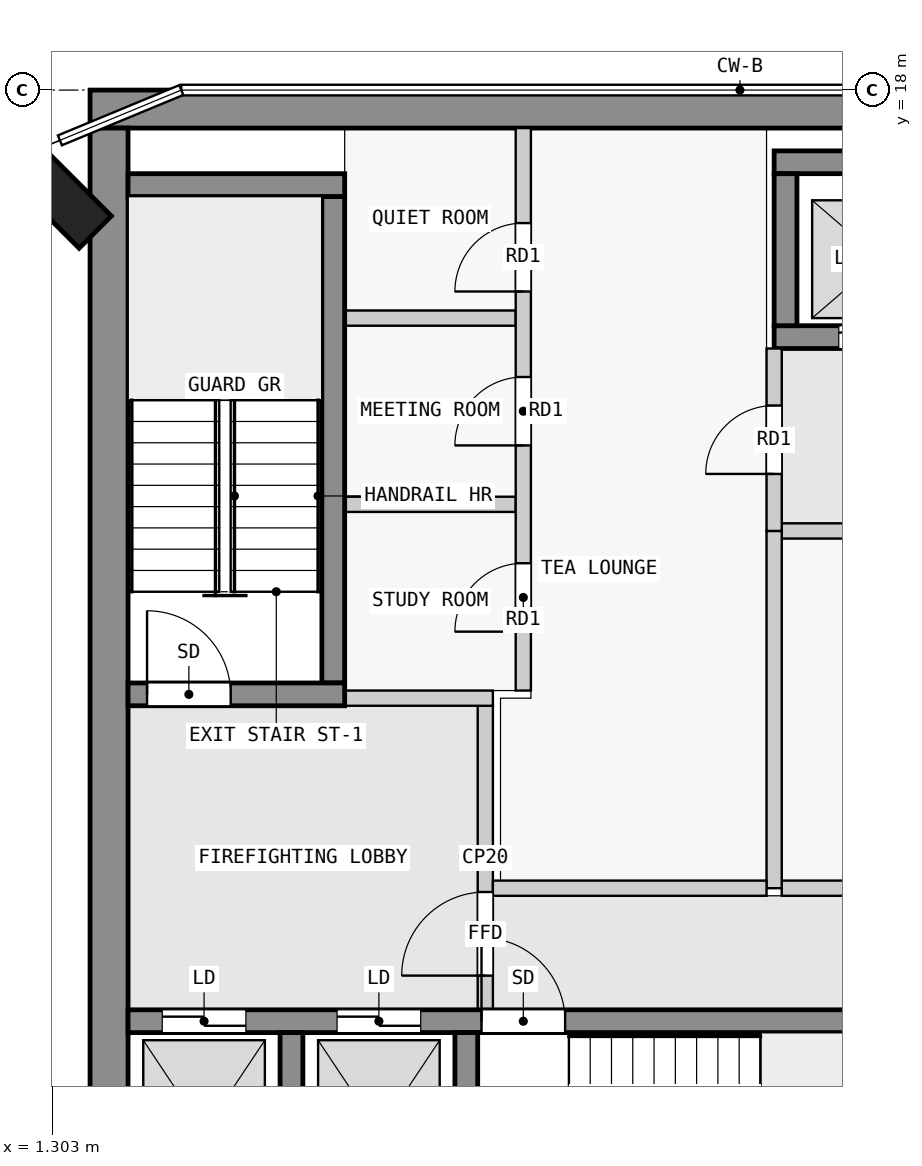
"""IFC4 building model, lengths in metres.
Left out: names, types, materials, properties, quantities, classifications, styles, units other than length and angle.
Written with IfcOpenShell. Run it as: python <this file> out.ifc"""

import sys

from ifc_helpers import new_model, si_unit, direction, frame, frame_2d, origin, origin_2d, place, context, subcontext, project, spatial, rectangle, extrude, element, fill, save


model = new_model("IFC4")
c1 = context("Model", 3, precision=1e-05, world=origin(), true_north=direction((0.0, 1.0)))
c2 = subcontext(c1, "Body", "Model", "MODEL_VIEW")
j1 = project(units=[si_unit("LENGTHUNIT", "METRE"), si_unit("PLANEANGLEUNIT", "RADIAN")], contexts=[c1])
p1 = place(None, origin())
s1 = spatial("IfcSite", under=j1, at=p1, CompositionType="ELEMENT")
p2 = place(p1, origin())
s2 = spatial("IfcBuilding", under=s1, at=p2, CompositionType="ELEMENT")
p3 = place(p2, frame((0.0, 0.0, 245.9)))
s3 = spatial("IfcBuildingStorey", under=s2, at=p3, CompositionType="ELEMENT", Elevation=245.9)
p4 = place(p3, frame((1.374, 16.626, 0.0), z_axis=(0.0, 0.0, 1.0), x_axis=(0.707106781187, 0.707106781187, 0.0)))
e1 = element("IfcColumn", 1, at=p4, inside=s3, PredefinedType="COLUMN", context=c2, shape_type="SweptSolid", body=[
    extrude(rectangle(XDim=0.6, YDim=1.4, at=origin_2d()), origin(), (0.0, 0.0, 1.0), 3.5),
])
p5 = place(p3, frame((1.8, 17.75, 0.0), z_axis=(0.0, 0.0, 1.0), x_axis=(1.0, 0.0, 0.0)))
e2 = element("IfcWall", 2, at=p5, inside=s3, PredefinedType="SHEAR", context=c2, shape_type="SweptSolid", body=[
    extrude(rectangle(XDim=20.7, YDim=0.5, at=frame_2d((10.35, 0.0))), origin(), (0.0, 0.0, 1.0), 3.25),
])
p6 = place(p3, frame((2.05, 2.5, 0.0), z_axis=(0.0, 0.0, 1.0), x_axis=(0.0, 1.0, 0.0)))
e3 = element("IfcWall", 3, at=p6, inside=s3, PredefinedType="SHEAR", context=c2, shape_type="SweptSolid", body=[
    extrude(rectangle(XDim=15.0, YDim=0.5, at=frame_2d((7.5, 0.0))), origin(), (0.0, 0.0, 1.0), 3.25),
])
for number, where, z_axis, x_axis in (
    (4, (4.45, 2.8, 0.0), (0.0, 0.0, 1.0), (0.0, 1.0, 0.0)),
    (5, (6.75, 2.8, 0.0), (0.0, 0.0, 1.0), (0.0, 1.0, 0.0)),
):
    element("IfcWall", number, at=place(p3, frame(where, z_axis=z_axis, x_axis=x_axis)), inside=s3, PredefinedType="SHEAR", context=c2, shape_type="SweptSolid", body=[
        extrude(rectangle(XDim=2.8, YDim=0.3, at=frame_2d((1.4, 0.0))), origin(), (0.0, 0.0, 1.0), 3.25),
    ])
p7 = place(p3, frame((2.3, 5.75, 0.0), z_axis=(0.0, 0.0, 1.0), x_axis=(1.0, 0.0, 0.0)))
e6 = element("IfcWall", 6, at=p7, inside=s3, PredefinedType="SHEAR", context=c2, shape_type="SweptSolid", body=[
    extrude(rectangle(XDim=18.8, YDim=0.3, at=frame_2d((9.4, 0.0))), origin(), (0.0, 0.0, 1.0), 3.25),
])
p8 = place(p7, frame((4.65, 0.0, 0.0)))
e7 = element("IfcOpeningElement", 7, at=p8, cuts=e6, PredefinedType="OPENING", context=c2, shape_type="SweptSolid", body=[
    extrude(rectangle(XDim=1.1, YDim=2.1, at=frame_2d((0.55, 1.05))), frame((0.0, 0.16, 0.0), z_axis=(0.0, -1.0, 0.0), x_axis=(1.0, 0.0, 0.0)), (0.0, 0.0, 1.0), 0.32),
])
p9 = place(p7, frame((0.45, 0.0, 0.0)))
e8 = element("IfcOpeningElement", 8, at=p9, cuts=e6, PredefinedType="OPENING", context=c2, shape_type="SweptSolid", body=[
    extrude(rectangle(XDim=1.1, YDim=2.1, at=frame_2d((0.55, 1.05))), frame((0.0, 0.16, 0.0), z_axis=(0.0, -1.0, 0.0), x_axis=(1.0, 0.0, 0.0)), (0.0, 0.0, 1.0), 0.32),
])
p10 = place(p7, frame((2.75, 0.0, 0.0)))
e9 = element("IfcOpeningElement", 9, at=p10, cuts=e6, PredefinedType="OPENING", context=c2, shape_type="SweptSolid", body=[
    extrude(rectangle(XDim=1.1, YDim=2.1, at=frame_2d((0.55, 1.05))), frame((0.0, 0.16, 0.0), z_axis=(0.0, -1.0, 0.0), x_axis=(1.0, 0.0, 0.0)), (0.0, 0.0, 1.0), 0.32),
])
p11 = place(p7, frame((13.2, 0.0, 0.0)))
e10 = element("IfcOpeningElement", 10, at=p11, cuts=e6, PredefinedType="OPENING", context=c2, shape_type="SweptSolid", body=[
    extrude(rectangle(XDim=0.9, YDim=2.1, at=frame_2d((0.45, 1.05))), frame((0.0, 0.16, 0.0), z_axis=(0.0, -1.0, 0.0), x_axis=(1.0, 0.0, 0.0)), (0.0, 0.0, 1.0), 0.32),
])
p12 = place(p7, frame((16.95, 0.0, 0.0)))
e11 = element("IfcOpeningElement", 11, at=p12, cuts=e6, PredefinedType="OPENING", context=c2, shape_type="SweptSolid", body=[
    extrude(rectangle(XDim=0.9, YDim=2.1, at=frame_2d((0.45, 1.05))), frame((0.0, 0.16, 0.0), z_axis=(0.0, -1.0, 0.0), x_axis=(1.0, 0.0, 0.0)), (0.0, 0.0, 1.0), 0.32),
])
p13 = place(p3, frame((2.3, 10.05, 0.0), z_axis=(0.0, 0.0, 1.0), x_axis=(1.0, 0.0, 0.0)))
e12 = element("IfcWall", 12, at=p13, inside=s3, PredefinedType="SHEAR", context=c2, shape_type="SweptSolid", body=[
    extrude(rectangle(XDim=2.85, YDim=0.3, at=frame_2d((1.425, 0.0))), origin(), (0.0, 0.0, 1.0), 3.25),
])
p14 = place(p13, frame((0.25, 0.0, 0.0)))
e13 = element("IfcOpeningElement", 13, at=p14, cuts=e12, PredefinedType="OPENING", context=c2, shape_type="SweptSolid", body=[
    extrude(rectangle(XDim=1.1, YDim=2.1, at=frame_2d((0.55, 1.05))), frame((0.0, 0.16, 0.0), z_axis=(0.0, -1.0, 0.0), x_axis=(1.0, 0.0, 0.0)), (0.0, 0.0, 1.0), 0.32),
])
p15 = place(p3, frame((5.0, 10.2, 0.0), z_axis=(0.0, 0.0, 1.0), x_axis=(0.0, 1.0, 0.0)))
e14 = element("IfcWall", 14, at=p15, inside=s3, PredefinedType="SHEAR", context=c2, shape_type="SweptSolid", body=[
    extrude(rectangle(XDim=6.4, YDim=0.3, at=frame_2d((3.2, 0.0))), origin(), (0.0, 0.0, 1.0), 3.25),
])
p16 = place(p3, frame((2.3, 16.75, 0.0), z_axis=(0.0, 0.0, 1.0), x_axis=(1.0, 0.0, 0.0)))
e15 = element("IfcWall", 15, at=p16, inside=s3, PredefinedType="SHEAR", context=c2, shape_type="SweptSolid", body=[
    extrude(rectangle(XDim=2.85, YDim=0.3, at=frame_2d((1.425, 0.0))), origin(), (0.0, 0.0, 1.0), 3.25),
])
p17 = place(p3, frame((10.8, 17.05, 0.0), z_axis=(0.0, 0.0, 1.0), x_axis=(1.0, 0.0, 0.0)))
e16 = element("IfcWall", 16, at=p17, inside=s3, PredefinedType="SHEAR", context=c2, shape_type="SweptSolid", body=[
    extrude(rectangle(XDim=7.8, YDim=0.3, at=frame_2d((3.9, 0.0))), origin(), (0.0, 0.0, 1.0), 3.25),
])
p18 = place(p3, frame((10.8, 14.75, 0.0), z_axis=(0.0, 0.0, 1.0), x_axis=(1.0, 0.0, 0.0)))
e17 = element("IfcWall", 17, at=p18, inside=s3, PredefinedType="SHEAR", context=c2, shape_type="SweptSolid", body=[
    extrude(rectangle(XDim=7.8, YDim=0.3, at=frame_2d((3.9, 0.0))), origin(), (0.0, 0.0, 1.0), 3.25),
])
p19 = place(p18, frame((0.85, 0.0, 0.0)))
e18 = element("IfcOpeningElement", 18, at=p19, cuts=e17, PredefinedType="OPENING", context=c2, shape_type="SweptSolid", body=[
    extrude(rectangle(XDim=1.1, YDim=2.1, at=frame_2d((0.55, 1.05))), frame((0.0, 0.16, 0.0), z_axis=(0.0, -1.0, 0.0), x_axis=(1.0, 0.0, 0.0)), (0.0, 0.0, 1.0), 0.32),
])
p20 = place(p18, frame((3.35, 0.0, 0.0)))
e19 = element("IfcOpeningElement", 19, at=p20, cuts=e17, PredefinedType="OPENING", context=c2, shape_type="SweptSolid", body=[
    extrude(rectangle(XDim=1.1, YDim=2.1, at=frame_2d((0.55, 1.05))), frame((0.0, 0.16, 0.0), z_axis=(0.0, -1.0, 0.0), x_axis=(1.0, 0.0, 0.0)), (0.0, 0.0, 1.0), 0.32),
])
p21 = place(p18, frame((5.85, 0.0, 0.0)))
e20 = element("IfcOpeningElement", 20, at=p21, cuts=e17, PredefinedType="OPENING", context=c2, shape_type="SweptSolid", body=[
    extrude(rectangle(XDim=1.1, YDim=2.1, at=frame_2d((0.55, 1.05))), frame((0.0, 0.16, 0.0), z_axis=(0.0, -1.0, 0.0), x_axis=(1.0, 0.0, 0.0)), (0.0, 0.0, 1.0), 0.32),
])
p22 = place(p3, frame((10.95, 14.9, 0.0), z_axis=(0.0, 0.0, 1.0), x_axis=(0.0, 1.0, 0.0)))
e21 = element("IfcWall", 21, at=p22, inside=s3, PredefinedType="SHEAR", context=c2, shape_type="SweptSolid", body=[
    extrude(rectangle(XDim=2.0, YDim=0.3, at=frame_2d((1.0, 0.0))), origin(), (0.0, 0.0, 1.0), 3.25),
])
p23 = place(p3, frame((7.0, 5.9, 0.0), z_axis=(0.0, 0.0, 1.0), x_axis=(0.0, 1.0, 0.0)))
e22 = element("IfcWall", 22, at=p23, inside=s3, PredefinedType="PARTITIONING", context=c2, shape_type="SweptSolid", body=[
    extrude(rectangle(XDim=4.0, YDim=0.2, at=frame_2d((2.0, 0.0))), origin(), (0.0, 0.0, 1.0), 3.25),
])
p24 = place(p23, frame((0.45, 0.0, 0.0)))
e23 = element("IfcOpeningElement", 23, at=p24, cuts=e22, PredefinedType="OPENING", context=c2, shape_type="SweptSolid", body=[
    extrude(rectangle(XDim=1.1, YDim=2.1, at=frame_2d((0.55, 1.05))), frame((0.0, 0.11, 0.0), z_axis=(0.0, -1.0, 0.0), x_axis=(1.0, 0.0, 0.0)), (0.0, 0.0, 1.0), 0.22),
])
p25 = place(p3, frame((5.15, 10.0, 0.0), z_axis=(0.0, 0.0, 1.0), x_axis=(1.0, 0.0, 0.0)))
e24 = element("IfcWall", 24, at=p25, inside=s3, PredefinedType="PARTITIONING", context=c2, shape_type="SweptSolid", body=[
    extrude(rectangle(XDim=1.95, YDim=0.2, at=frame_2d((0.975, 0.0))), origin(), (0.0, 0.0, 1.0), 3.25),
])
p26 = place(p3, frame((7.1, 7.5, 0.0), z_axis=(0.0, 0.0, 1.0), x_axis=(1.0, 0.0, 0.0)))
e25 = element("IfcWall", 25, at=p26, inside=s3, PredefinedType="PARTITIONING", context=c2, shape_type="SweptSolid", body=[
    extrude(rectangle(XDim=3.6, YDim=0.2, at=frame_2d((1.8, 0.0))), origin(), (0.0, 0.0, 1.0), 3.25),
])
p27 = place(p3, frame((10.8, 12.2, 0.0), z_axis=(0.0, 0.0, 1.0), x_axis=(0.0, 1.0, 0.0)))
e26 = element("IfcWall", 26, at=p27, inside=s3, PredefinedType="PARTITIONING", context=c2, shape_type="SweptSolid", body=[
    extrude(rectangle(XDim=2.4, YDim=0.2, at=frame_2d((1.2, 0.0))), origin(), (0.0, 0.0, 1.0), 3.25),
])
p28 = place(p27, frame((0.75, 0.0, 0.0)))
e27 = element("IfcOpeningElement", 27, at=p28, cuts=e26, PredefinedType="OPENING", context=c2, shape_type="SweptSolid", body=[
    extrude(rectangle(XDim=0.9, YDim=2.1, at=frame_2d((0.45, 1.05))), frame((0.0, 0.11, 0.0), z_axis=(0.0, -1.0, 0.0), x_axis=(1.0, 0.0, 0.0)), (0.0, 0.0, 1.0), 0.22),
])
p29 = place(p3, frame((10.8, 7.5, 0.0), z_axis=(0.0, 0.0, 1.0), x_axis=(0.0, 1.0, 0.0)))
e28 = element("IfcWall", 28, at=p29, inside=s3, PredefinedType="PARTITIONING", context=c2, shape_type="SweptSolid", body=[
    extrude(rectangle(XDim=4.7, YDim=0.2, at=frame_2d((2.35, 0.0))), origin(), (0.0, 0.0, 1.0), 3.25),
])
p30 = place(p3, frame((10.9, 7.5, 0.0), z_axis=(0.0, 0.0, 1.0), x_axis=(1.0, 0.0, 0.0)))
e29 = element("IfcWall", 29, at=p30, inside=s3, PredefinedType="PARTITIONING", context=c2, shape_type="SweptSolid", body=[
    extrude(rectangle(XDim=8.6, YDim=0.2, at=frame_2d((4.3, 0.0))), origin(), (0.0, 0.0, 1.0), 3.25),
])
p31 = place(p3, frame((10.9, 12.2, 0.0), z_axis=(0.0, 0.0, 1.0), x_axis=(1.0, 0.0, 0.0)))
e30 = element("IfcWall", 30, at=p31, inside=s3, PredefinedType="PARTITIONING", context=c2, shape_type="SweptSolid", body=[
    extrude(rectangle(XDim=8.6, YDim=0.2, at=frame_2d((4.3, 0.0))), origin(), (0.0, 0.0, 1.0), 3.25),
])
p32 = place(p31, frame((3.85, 0.0, 0.0)))
e31 = element("IfcOpeningElement", 31, at=p32, cuts=e30, PredefinedType="OPENING", context=c2, shape_type="SweptSolid", body=[
    extrude(rectangle(XDim=0.9, YDim=2.1, at=frame_2d((0.45, 1.05))), frame((0.0, 0.11, 0.0), z_axis=(0.0, -1.0, 0.0), x_axis=(1.0, 0.0, 0.0)), (0.0, 0.0, 1.0), 0.22),
])
p33 = place(p3, frame((7.5, 10.1, 0.0), z_axis=(0.0, 0.0, 1.0), x_axis=(0.0, 1.0, 0.0)))
e32 = element("IfcWall", 32, at=p33, inside=s3, PredefinedType="PARTITIONING", context=c2, shape_type="SweptSolid", body=[
    extrude(rectangle(XDim=7.4, YDim=0.2, at=frame_2d((3.7, 0.0))), origin(), (0.0, 0.0, 1.0), 3.25),
])
p34 = place(p33, frame((0.775, 0.0, 0.0)))
e33 = element("IfcOpeningElement", 33, at=p34, cuts=e32, PredefinedType="OPENING", context=c2, shape_type="SweptSolid", body=[
    extrude(rectangle(XDim=0.9, YDim=2.1, at=frame_2d((0.45, 1.05))), frame((0.0, 0.11, 0.0), z_axis=(0.0, -1.0, 0.0), x_axis=(1.0, 0.0, 0.0)), (0.0, 0.0, 1.0), 0.22),
])
p35 = place(p33, frame((3.225, 0.0, 0.0)))
e34 = element("IfcOpeningElement", 34, at=p35, cuts=e32, PredefinedType="OPENING", context=c2, shape_type="SweptSolid", body=[
    extrude(rectangle(XDim=0.9, YDim=2.1, at=frame_2d((0.45, 1.05))), frame((0.0, 0.11, 0.0), z_axis=(0.0, -1.0, 0.0), x_axis=(1.0, 0.0, 0.0)), (0.0, 0.0, 1.0), 0.22),
])
p36 = place(p33, frame((5.25, 0.0, 0.0)))
e35 = element("IfcOpeningElement", 35, at=p36, cuts=e32, PredefinedType="OPENING", context=c2, shape_type="SweptSolid", body=[
    extrude(rectangle(XDim=0.9, YDim=2.1, at=frame_2d((0.45, 1.05))), frame((0.0, 0.11, 0.0), z_axis=(0.0, -1.0, 0.0), x_axis=(1.0, 0.0, 0.0)), (0.0, 0.0, 1.0), 0.22),
])
for number, where, z_axis, x_axis in (
    (36, (5.15, 12.55, 0.0), (0.0, 0.0, 1.0), (1.0, 0.0, 0.0)),
    (37, (5.15, 15.0, 0.0), (0.0, 0.0, 1.0), (1.0, 0.0, 0.0)),
):
    element("IfcWall", number, at=place(p3, frame(where, z_axis=z_axis, x_axis=x_axis)), inside=s3, PredefinedType="PARTITIONING", context=c2, shape_type="SweptSolid", body=[
        extrude(rectangle(XDim=2.25, YDim=0.2, at=frame_2d((1.125, 0.0))), origin(), (0.0, 0.0, 1.0), 3.25),
    ])
p37 = place(p24, origin())
e38 = element("IfcDoor", 38, at=p37, inside=s3, OperationType="SINGLE_SWING_LEFT", PredefinedType="DOOR", context=c2, shape_type="SweptSolid", body=[
    extrude(rectangle(XDim=1.1, YDim=2.1, at=frame_2d((0.55, 1.05))), frame((0.0, 0.025, 0.0), z_axis=(0.0, -1.0, 0.0), x_axis=(1.0, 0.0, 0.0)), (0.0, 0.0, 1.0), 0.05),
])
fill(e23, e38)
p38 = place(p14, origin())
e39 = element("IfcDoor", 39, at=p38, inside=s3, OperationType="SINGLE_SWING_RIGHT", PredefinedType="DOOR", context=c2, shape_type="SweptSolid", body=[
    extrude(rectangle(XDim=1.1, YDim=2.1, at=frame_2d((0.55, 1.05))), frame((0.0, 0.025, 0.0), z_axis=(0.0, -1.0, 0.0), x_axis=(1.0, 0.0, 0.0)), (0.0, 0.0, 1.0), 0.05),
])
fill(e13, e39)
p39 = place(p28, origin())
e40 = element("IfcDoor", 40, at=p39, inside=s3, OperationType="SINGLE_SWING_LEFT", PredefinedType="DOOR", context=c2, shape_type="SweptSolid", body=[
    extrude(rectangle(XDim=0.9, YDim=2.1, at=frame_2d((0.45, 1.05))), frame((0.0, 0.025, 0.0), z_axis=(0.0, -1.0, 0.0), x_axis=(1.0, 0.0, 0.0)), (0.0, 0.0, 1.0), 0.05),
])
fill(e27, e40)
p40 = place(p8, origin())
e41 = element("IfcDoor", 41, at=p40, inside=s3, OperationType="SINGLE_SWING_LEFT", PredefinedType="DOOR", context=c2, shape_type="SweptSolid", body=[
    extrude(rectangle(XDim=1.1, YDim=2.1, at=frame_2d((0.55, 1.05))), frame((0.0, 0.025, 0.0), z_axis=(0.0, -1.0, 0.0), x_axis=(1.0, 0.0, 0.0)), (0.0, 0.0, 1.0), 0.05),
])
fill(e7, e41)
p41 = place(p9, origin())
e42 = element("IfcDoor", 42, at=p41, inside=s3, OperationType="DOUBLE_DOOR_SLIDING", PredefinedType="DOOR", context=c2, shape_type="SweptSolid", body=[
    extrude(rectangle(XDim=1.1, YDim=2.1, at=frame_2d((0.55, 1.05))), frame((0.0, 0.025, 0.0), z_axis=(0.0, -1.0, 0.0), x_axis=(1.0, 0.0, 0.0)), (0.0, 0.0, 1.0), 0.05),
])
fill(e8, e42)
p42 = place(p10, origin())
e43 = element("IfcDoor", 43, at=p42, inside=s3, OperationType="DOUBLE_DOOR_SLIDING", PredefinedType="DOOR", context=c2, shape_type="SweptSolid", body=[
    extrude(rectangle(XDim=1.1, YDim=2.1, at=frame_2d((0.55, 1.05))), frame((0.0, 0.025, 0.0), z_axis=(0.0, -1.0, 0.0), x_axis=(1.0, 0.0, 0.0)), (0.0, 0.0, 1.0), 0.05),
])
fill(e9, e43)
p43 = place(p19, origin())
e44 = element("IfcDoor", 44, at=p43, inside=s3, OperationType="DOUBLE_DOOR_SLIDING", PredefinedType="DOOR", context=c2, shape_type="SweptSolid", body=[
    extrude(rectangle(XDim=1.1, YDim=2.1, at=frame_2d((0.55, 1.05))), frame((0.0, 0.025, 0.0), z_axis=(0.0, -1.0, 0.0), x_axis=(1.0, 0.0, 0.0)), (0.0, 0.0, 1.0), 0.05),
])
fill(e18, e44)
p44 = place(p34, origin())
e45 = element("IfcDoor", 45, at=p44, inside=s3, OperationType="SINGLE_SWING_RIGHT", PredefinedType="DOOR", context=c2, shape_type="SweptSolid", body=[
    extrude(rectangle(XDim=0.9, YDim=2.1, at=frame_2d((0.45, 1.05))), frame((0.0, 0.025, 0.0), z_axis=(0.0, -1.0, 0.0), x_axis=(1.0, 0.0, 0.0)), (0.0, 0.0, 1.0), 0.05),
])
fill(e33, e45)
p45 = place(p35, origin())
e46 = element("IfcDoor", 46, at=p45, inside=s3, OperationType="SINGLE_SWING_RIGHT", PredefinedType="DOOR", context=c2, shape_type="SweptSolid", body=[
    extrude(rectangle(XDim=0.9, YDim=2.1, at=frame_2d((0.45, 1.05))), frame((0.0, 0.025, 0.0), z_axis=(0.0, -1.0, 0.0), x_axis=(1.0, 0.0, 0.0)), (0.0, 0.0, 1.0), 0.05),
])
fill(e34, e46)
p46 = place(p36, origin())
e47 = element("IfcDoor", 47, at=p46, inside=s3, OperationType="SINGLE_SWING_RIGHT", PredefinedType="DOOR", context=c2, shape_type="SweptSolid", body=[
    extrude(rectangle(XDim=0.9, YDim=2.1, at=frame_2d((0.45, 1.05))), frame((0.0, 0.025, 0.0), z_axis=(0.0, -1.0, 0.0), x_axis=(1.0, 0.0, 0.0)), (0.0, 0.0, 1.0), 0.05),
])
fill(e35, e47)
save(model, sys.argv[1])
